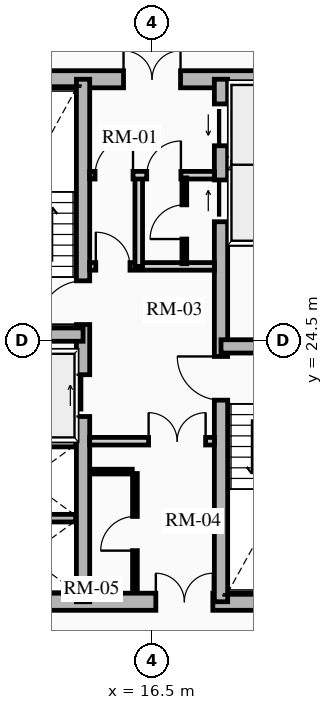
"""IFC4 building model, lengths in metres.
Left out: names, types, materials, properties, quantities, classifications, styles, units other than length and angle.
Written with IfcOpenShell. Run it as: python <this file> out.ifc"""

import sys

from ifc_helpers import new_model, si_unit, direction, frame, frame_2d, origin, place, context, subcontext, project, spatial, rectangle, extrude, source, transform, mapped, element, fill, save


model = new_model("IFC4")
c1 = context("Model", 3, precision=1e-05, world=origin(), true_north=direction((0.0, 1.0)))
c2 = subcontext(c1, "Body", "Model", "MODEL_VIEW")
j1 = project(units=[si_unit("LENGTHUNIT", "METRE"), si_unit("PLANEANGLEUNIT", "RADIAN")], contexts=[c1])
p1 = place(None, origin())
s1 = spatial("IfcSite", under=j1, at=p1, CompositionType="ELEMENT")
p2 = place(p1, origin())
s2 = spatial("IfcBuilding", under=s1, at=p2, CompositionType="ELEMENT")
p3 = place(p2, frame((0.0, 0.0, 70.15)))
s3 = spatial("IfcBuildingStorey", under=s2, at=p3, CompositionType="ELEMENT", Elevation=70.15)
p4 = place(p3, frame((11.15, 17.625, 0.0), z_axis=(0.0, 0.0, 1.0), x_axis=(1.0, 0.0, 0.0)))
e1 = element("IfcWall", 1, at=p4, inside=s3, PredefinedType="SHEAR", context=c2, shape_type="SweptSolid", body=[
    extrude(rectangle(XDim=10.7, YDim=0.45, at=frame_2d((5.35, 0.0))), origin(), (0.0, 0.0, 1.0), 2.91),
])
m1 = source(origin(), c2, "Body", "SweptSolid", [
    extrude(rectangle(XDim=1.5, YDim=2.02, at=frame_2d((0.75, 1.01))), frame((0.0, 0.235, 0.0), z_axis=(0.0, -1.0, 0.0), x_axis=(1.0, 0.0, 0.0)), (0.0, 0.0, 1.0), 0.47),
])
p5 = place(p4, frame((5.45, 0.0, 0.0)))
e2 = element("IfcOpeningElement", 2, at=p5, cuts=e1, PredefinedType="OPENING", context=c2, shape_type="MappedRepresentation", body=[
    mapped(m1, transform((0.0, 0.0, 0.0), x_axis=(1.0, 0.0, 0.0), y_axis=(0.0, 1.0, 0.0), z_axis=(0.0, 0.0, 1.0), scale=1.0)),
])
p6 = place(p3, frame((11.15, 31.375, 0.0), z_axis=(0.0, 0.0, 1.0), x_axis=(1.0, 0.0, 0.0)))
e3 = element("IfcWall", 3, at=p6, inside=s3, PredefinedType="SHEAR", context=c2, shape_type="SweptSolid", body=[
    extrude(rectangle(XDim=10.7, YDim=0.45, at=frame_2d((5.35, 0.0))), origin(), (0.0, 0.0, 1.0), 2.91),
])
p7 = place(p6, frame((4.6, 0.0, 0.0)))
e4 = element("IfcOpeningElement", 4, at=p7, cuts=e3, PredefinedType="OPENING", context=c2, shape_type="MappedRepresentation", body=[
    mapped(m1, transform((0.0, 0.0, 0.0), x_axis=(1.0, 0.0, 0.0), y_axis=(0.0, 1.0, 0.0), z_axis=(0.0, 0.0, 1.0), scale=1.0)),
])
p8 = place(p3, frame((14.685, 17.625, 0.0), z_axis=(0.0, 0.0, 1.0), x_axis=(0.0, 1.0, 0.0)))
e5 = element("IfcWall", 5, at=p8, inside=s3, PredefinedType="SHEAR", context=c2, shape_type="SweptSolid", body=[
    extrude(rectangle(XDim=13.75, YDim=0.35, at=frame_2d((6.875, 0.0))), origin(), (0.0, 0.0, 1.0), 2.91),
])
m2 = source(origin(), c2, "Body", "SweptSolid", [
    extrude(rectangle(XDim=1.1, YDim=2.015, at=frame_2d((0.55, 1.007))), frame((0.0, 0.185, 0.0), z_axis=(0.0, -1.0, 0.0), x_axis=(1.0, 0.0, 0.0)), (0.0, 0.0, 1.0), 0.37),
])
p9 = place(p8, frame((4.875, 0.0, 0.0)))
e6 = element("IfcOpeningElement", 6, at=p9, cuts=e5, PredefinedType="OPENING", context=c2, shape_type="MappedRepresentation", body=[
    mapped(m2, transform((0.0, 0.0, 0.0), x_axis=(1.0, 0.0, 0.0), y_axis=(0.0, 1.0, 0.0), z_axis=(0.0, 0.0, 1.0), scale=1.0)),
])
m3 = source(origin(), c2, "Body", "SweptSolid", [
    extrude(rectangle(XDim=1.15, YDim=2.02, at=frame_2d((0.575, 1.01))), frame((0.0, 0.185, 0.0), z_axis=(0.0, -1.0, 0.0), x_axis=(1.0, 0.0, 0.0)), (0.0, 0.0, 1.0), 0.37),
])
p10 = place(p8, frame((7.295, 0.0, 0.0)))
e7 = element("IfcOpeningElement", 7, at=p10, cuts=e5, PredefinedType="OPENING", context=c2, shape_type="MappedRepresentation", body=[
    mapped(m3, transform((0.0, 0.0, 0.0), x_axis=(1.0, 0.0, 0.0), y_axis=(0.0, 1.0, 0.0), z_axis=(0.0, 0.0, 1.0), scale=1.0)),
])
p11 = place(p3, frame((18.315, 17.625, 0.0), z_axis=(0.0, 0.0, 1.0), x_axis=(0.0, 1.0, 0.0)))
e8 = element("IfcWall", 8, at=p11, inside=s3, PredefinedType="SHEAR", context=c2, shape_type="SweptSolid", body=[
    extrude(rectangle(XDim=13.75, YDim=0.35, at=frame_2d((6.875, 0.0))), origin(), (0.0, 0.0, 1.0), 2.91),
])
p12 = place(p11, frame((10.0, 0.0, 0.0)))
e9 = element("IfcOpeningElement", 9, at=p12, cuts=e8, PredefinedType="OPENING", context=c2, shape_type="MappedRepresentation", body=[
    mapped(m2, transform((0.0, 0.0, 0.0), x_axis=(1.0, 0.0, 0.0), y_axis=(0.0, 1.0, 0.0), z_axis=(0.0, 0.0, 1.0), scale=1.0)),
])
p13 = place(p11, frame((12.0, 0.0, 0.0)))
e10 = element("IfcOpeningElement", 10, at=p13, cuts=e8, PredefinedType="OPENING", context=c2, shape_type="MappedRepresentation", body=[
    mapped(m2, transform((0.0, 0.0, 0.0), x_axis=(1.0, 0.0, 0.0), y_axis=(0.0, 1.0, 0.0), z_axis=(0.0, 0.0, 1.0), scale=1.0)),
])
p14 = place(p11, frame((5.305, 0.0, 0.0)))
e11 = element("IfcOpeningElement", 11, at=p14, cuts=e8, PredefinedType="OPENING", context=c2, shape_type="MappedRepresentation", body=[
    mapped(m3, transform((0.0, 0.0, 0.0), x_axis=(1.0, 0.0, 0.0), y_axis=(0.0, 1.0, 0.0), z_axis=(0.0, 0.0, 1.0), scale=1.0)),
])
for number, where, z_axis, x_axis in (
    (12, (11.4, 24.655, 0.0), (0.0, 0.0, 1.0), (1.0, 0.0, 0.0)),
    (13, (18.315, 24.345, 0.0), (0.0, 0.0, 1.0), (1.0, 0.0, 0.0)),
):
    element("IfcWall", number, at=place(p3, frame(where, z_axis=z_axis, x_axis=x_axis)), inside=s3, PredefinedType="SHEAR", context=c2, shape_type="SweptSolid", body=[
        extrude(rectangle(XDim=3.285, YDim=0.35, at=frame_2d((1.643, 0.0))), origin(), (0.0, 0.0, 1.0), 2.91),
    ])
for number, where, z_axis, x_axis in (
    (14, (11.52, 21.8, 0.0), (0.0, 0.0, 1.0), (1.0, 0.0, 0.0)),
    (15, (11.52, 19.825, 0.0), (0.0, 0.0, 1.0), (1.0, 0.0, 0.0)),
    (16, (18.51, 27.13, 0.0), (0.0, 0.0, 1.0), (1.0, 0.0, 0.0)),
    (17, (18.51, 29.175, 0.0), (0.0, 0.0, 1.0), (1.0, 0.0, 0.0)),
):
    element("IfcWall", number, at=place(p3, frame(where, z_axis=z_axis, x_axis=x_axis)), inside=s3, PredefinedType="SHEAR", context=c2, shape_type="SweptSolid", body=[
        extrude(rectangle(XDim=2.97, YDim=0.2, at=frame_2d((1.485, 0.0))), origin(), (0.0, 0.0, 1.0), 2.91),
    ])
p15 = place(p3, frame((14.86, 21.85, 0.0), z_axis=(0.0, 0.0, 1.0), x_axis=(1.0, 0.0, 0.0)))
e18 = element("IfcWall", 18, at=p15, inside=s3, PredefinedType="PARTITIONING", context=c2, shape_type="SweptSolid", body=[
    extrude(rectangle(XDim=3.28, YDim=0.2, at=frame_2d((1.64, 0.0))), origin(), (0.0, 0.0, 1.0), 2.655),
])
m4 = source(origin(), c2, "Body", "SweptSolid", [
    extrude(rectangle(XDim=1.5, YDim=2.02, at=frame_2d((0.75, 1.01))), frame((0.0, 0.11, 0.0), z_axis=(0.0, -1.0, 0.0), x_axis=(1.0, 0.0, 0.0)), (0.0, 0.0, 1.0), 0.22),
])
p16 = place(p15, frame((1.55, 0.0, 0.0)))
e19 = element("IfcOpeningElement", 19, at=p16, cuts=e18, PredefinedType="OPENING", context=c2, shape_type="MappedRepresentation", body=[
    mapped(m4, transform((0.0, 0.0, 0.0), x_axis=(1.0, 0.0, 0.0), y_axis=(0.0, 1.0, 0.0), z_axis=(0.0, 0.0, 1.0), scale=1.0)),
])
p17 = place(p3, frame((14.86, 26.45, 0.0), z_axis=(0.0, 0.0, 1.0), x_axis=(1.0, 0.0, 0.0)))
e20 = element("IfcWall", 20, at=p17, inside=s3, PredefinedType="PARTITIONING", context=c2, shape_type="SweptSolid", body=[
    extrude(rectangle(XDim=3.28, YDim=0.2, at=frame_2d((1.64, 0.0))), origin(), (0.0, 0.0, 1.0), 2.655),
])
m5 = source(origin(), c2, "Body", "SweptSolid", [
    extrude(rectangle(XDim=0.9, YDim=2.005, at=frame_2d((0.45, 1.002))), frame((0.0, 0.11, 0.0), z_axis=(0.0, -1.0, 0.0), x_axis=(1.0, 0.0, 0.0)), (0.0, 0.0, 1.0), 0.22),
])
p18 = place(p17, frame((0.16, 0.0, 0.0)))
e21 = element("IfcOpeningElement", 21, at=p18, cuts=e20, PredefinedType="OPENING", context=c2, shape_type="MappedRepresentation", body=[
    mapped(m5, transform((0.0, 0.0, 0.0), x_axis=(1.0, 0.0, 0.0), y_axis=(0.0, 1.0, 0.0), z_axis=(0.0, 0.0, 1.0), scale=1.0)),
])
p19 = place(p3, frame((16.15, 26.45, 0.0), z_axis=(0.0, 0.0, 1.0), x_axis=(0.0, 1.0, 0.0)))
e22 = element("IfcWall", 22, at=p19, inside=s3, PredefinedType="PARTITIONING", context=c2, shape_type="SweptSolid", body=[
    extrude(rectangle(XDim=2.4, YDim=0.2, at=frame_2d((1.2, 0.0))), origin(), (0.0, 0.0, 1.0), 2.655),
])
p20 = place(p3, frame((14.86, 28.85, 0.0), z_axis=(0.0, 0.0, 1.0), x_axis=(1.0, 0.0, 0.0)))
e23 = element("IfcWall", 23, at=p20, inside=s3, PredefinedType="PARTITIONING", context=c2, shape_type="SweptSolid", body=[
    extrude(rectangle(XDim=3.28, YDim=0.2, at=frame_2d((1.64, 0.0))), origin(), (0.0, 0.0, 1.0), 2.655),
])
m6 = source(origin(), c2, "Body", "SweptSolid", [
    extrude(rectangle(XDim=1.0, YDim=2.015, at=frame_2d((0.5, 1.007))), frame((0.0, 0.11, 0.0), z_axis=(0.0, -1.0, 0.0), x_axis=(1.0, 0.0, 0.0)), (0.0, 0.0, 1.0), 0.22),
])
p21 = place(p20, frame((0.14, 0.0, 0.0)))
e24 = element("IfcOpeningElement", 24, at=p21, cuts=e23, PredefinedType="OPENING", context=c2, shape_type="MappedRepresentation", body=[
    mapped(m6, transform((0.0, 0.0, 0.0), x_axis=(1.0, 0.0, 0.0), y_axis=(0.0, 1.0, 0.0), z_axis=(0.0, 0.0, 1.0), scale=1.0)),
])
p22 = place(p20, frame((1.5, 0.0, 0.0)))
e25 = element("IfcOpeningElement", 25, at=p22, cuts=e23, PredefinedType="OPENING", context=c2, shape_type="MappedRepresentation", body=[
    mapped(m5, transform((0.0, 0.0, 0.0), x_axis=(1.0, 0.0, 0.0), y_axis=(0.0, 1.0, 0.0), z_axis=(0.0, 0.0, 1.0), scale=1.0)),
])
p23 = place(p3, frame((16.05, 17.92, 0.0), z_axis=(0.0, 0.0, 1.0), x_axis=(0.0, 1.0, 0.0)))
e26 = element("IfcWall", 26, at=p23, inside=s3, PredefinedType="PARTITIONING", context=c2, shape_type="SweptSolid", body=[
    extrude(rectangle(XDim=3.08, YDim=0.125, at=frame_2d((1.54, 0.0))), origin(), (0.0, 0.0, 1.0), 2.655),
])
m7 = source(origin(), c2, "Body", "SweptSolid", [
    extrude(rectangle(XDim=0.9, YDim=2.005, at=frame_2d((0.45, 1.002))), frame((0.0, 0.073, 0.0), z_axis=(0.0, -1.0, 0.0), x_axis=(1.0, 0.0, 0.0)), (0.0, 0.0, 1.0), 0.145),
])
p24 = place(p23, frame((1.05, 0.0, 0.0)))
e27 = element("IfcOpeningElement", 27, at=p24, cuts=e26, PredefinedType="OPENING", context=c2, shape_type="MappedRepresentation", body=[
    mapped(m7, transform((0.0, 0.0, 0.0), x_axis=(1.0, 0.0, 0.0), y_axis=(0.0, 1.0, 0.0), z_axis=(0.0, 0.0, 1.0), scale=1.0)),
])
p25 = place(p3, frame((14.88, 21.05, 0.0), z_axis=(0.0, 0.0, 1.0), x_axis=(1.0, 0.0, 0.0)))
e28 = element("IfcWall", 28, at=p25, inside=s3, PredefinedType="PARTITIONING", context=c2, shape_type="SweptSolid", body=[
    extrude(rectangle(XDim=1.1, YDim=0.125, at=frame_2d((0.55, 0.0))), origin(), (0.0, 0.0, 1.0), 2.655),
])
p26 = place(p3, frame((17.35, 26.52, 0.0), z_axis=(0.0, 0.0, 1.0), x_axis=(0.0, 1.0, 0.0)))
e29 = element("IfcWall", 29, at=p26, inside=s3, PredefinedType="PARTITIONING", context=c2, shape_type="SweptSolid", body=[
    extrude(rectangle(XDim=2.26, YDim=0.125, at=frame_2d((1.13, 0.0))), origin(), (0.0, 0.0, 1.0), 2.655),
])
p27 = place(p26, frame((0.65, 0.0, 0.0)))
e30 = element("IfcOpeningElement", 30, at=p27, cuts=e29, PredefinedType="OPENING", context=c2, shape_type="MappedRepresentation", body=[
    mapped(m7, transform((0.0, 0.0, 0.0), x_axis=(1.0, 0.0, 0.0), y_axis=(0.0, 1.0, 0.0), z_axis=(0.0, 0.0, 1.0), scale=1.0)),
])
m8 = source(origin(), c2, "Body", "SweptSolid", [
    extrude(rectangle(XDim=1.1, YDim=2.015, at=frame_2d((0.55, 1.007))), frame((0.0, 0.025, 0.0), z_axis=(0.0, -1.0, 0.0), x_axis=(1.0, 0.0, 0.0)), (0.0, 0.0, 1.0), 0.05),
])
p28 = place(p9, origin())
e31 = element("IfcDoor", 31, at=p28, inside=s3, OperationType="SLIDING_TO_RIGHT", PredefinedType="DOOR", context=c2, shape_type="MappedRepresentation", body=[
    mapped(m8, transform((0.0, 0.0, 0.0), x_axis=(1.0, 0.0, 0.0), y_axis=(0.0, 1.0, 0.0), z_axis=(0.0, 0.0, 1.0), scale=1.0)),
])
fill(e6, e31)
p29 = place(p12, origin())
e32 = element("IfcDoor", 32, at=p29, inside=s3, OperationType="SLIDING_TO_RIGHT", PredefinedType="DOOR", context=c2, shape_type="MappedRepresentation", body=[
    mapped(m8, transform((0.0, 0.0, 0.0), x_axis=(1.0, 0.0, 0.0), y_axis=(0.0, 1.0, 0.0), z_axis=(0.0, 0.0, 1.0), scale=1.0)),
])
fill(e9, e32)
p30 = place(p13, origin())
e33 = element("IfcDoor", 33, at=p30, inside=s3, OperationType="SLIDING_TO_LEFT", PredefinedType="DOOR", context=c2, shape_type="MappedRepresentation", body=[
    mapped(m8, transform((0.0, 0.0, 0.0), x_axis=(1.0, 0.0, 0.0), y_axis=(0.0, 1.0, 0.0), z_axis=(0.0, 0.0, 1.0), scale=1.0)),
])
fill(e10, e33)
m9 = source(origin(), c2, "Body", "SweptSolid", [
    extrude(rectangle(XDim=1.15, YDim=2.02, at=frame_2d((0.575, 1.01))), frame((0.0, 0.025, 0.0), z_axis=(0.0, -1.0, 0.0), x_axis=(1.0, 0.0, 0.0)), (0.0, 0.0, 1.0), 0.05),
])
p31 = place(p10, origin())
e34 = element("IfcDoor", 34, at=p31, inside=s3, OperationType="SINGLE_SWING_LEFT", PredefinedType="DOOR", context=c2, shape_type="MappedRepresentation", body=[
    mapped(m9, transform((0.0, 0.0, 0.0), x_axis=(1.0, 0.0, 0.0), y_axis=(0.0, 1.0, 0.0), z_axis=(0.0, 0.0, 1.0), scale=1.0)),
])
fill(e7, e34)
p32 = place(p14, origin())
e35 = element("IfcDoor", 35, at=p32, inside=s3, OperationType="SINGLE_SWING_RIGHT", PredefinedType="DOOR", context=c2, shape_type="MappedRepresentation", body=[
    mapped(m9, transform((0.0, 0.0, 0.0), x_axis=(1.0, 0.0, 0.0), y_axis=(0.0, 1.0, 0.0), z_axis=(0.0, 0.0, 1.0), scale=1.0)),
])
fill(e11, e35)
m10 = source(origin(), c2, "Body", "SweptSolid", [
    extrude(rectangle(XDim=1.5, YDim=2.02, at=frame_2d((0.75, 1.01))), frame((0.0, 0.025, 0.0), z_axis=(0.0, -1.0, 0.0), x_axis=(1.0, 0.0, 0.0)), (0.0, 0.0, 1.0), 0.05),
])
p33 = place(p7, origin())
e36 = element("IfcDoor", 36, at=p33, inside=s3, OperationType="DOUBLE_DOOR_SINGLE_SWING", PredefinedType="DOOR", context=c2, shape_type="MappedRepresentation", body=[
    mapped(m10, transform((0.0, 0.0, 0.0), x_axis=(1.0, 0.0, 0.0), y_axis=(0.0, 1.0, 0.0), z_axis=(0.0, 0.0, 1.0), scale=1.0)),
])
fill(e4, e36)
p34 = place(p5, origin())
e37 = element("IfcDoor", 37, at=p34, inside=s3, OperationType="DOUBLE_DOOR_SINGLE_SWING", PredefinedType="DOOR", context=c2, shape_type="MappedRepresentation", body=[
    mapped(m10, transform((0.0, 0.0, 0.0), x_axis=(1.0, 0.0, 0.0), y_axis=(0.0, 1.0, 0.0), z_axis=(0.0, 0.0, 1.0), scale=1.0)),
])
fill(e2, e37)
p35 = place(p16, origin())
e38 = element("IfcDoor", 38, at=p35, inside=s3, OperationType="DOUBLE_DOOR_SINGLE_SWING", PredefinedType="DOOR", context=c2, shape_type="MappedRepresentation", body=[
    mapped(m10, transform((0.0, 0.0, 0.0), x_axis=(1.0, 0.0, 0.0), y_axis=(0.0, 1.0, 0.0), z_axis=(0.0, 0.0, 1.0), scale=1.0)),
])
fill(e19, e38)
m11 = source(origin(), c2, "Body", "SweptSolid", [
    extrude(rectangle(XDim=0.9, YDim=2.005, at=frame_2d((0.45, 1.002))), frame((0.0, 0.025, 0.0), z_axis=(0.0, -1.0, 0.0), x_axis=(1.0, 0.0, 0.0)), (0.0, 0.0, 1.0), 0.05),
])
p36 = place(p18, origin())
e39 = element("IfcDoor", 39, at=p36, inside=s3, OperationType="SINGLE_SWING_LEFT", PredefinedType="DOOR", context=c2, shape_type="MappedRepresentation", body=[
    mapped(m11, transform((0.0, 0.0, 0.0), x_axis=(1.0, 0.0, 0.0), y_axis=(0.0, 1.0, 0.0), z_axis=(0.0, 0.0, 1.0), scale=1.0)),
])
fill(e21, e39)
m12 = source(origin(), c2, "Body", "SweptSolid", [
    extrude(rectangle(XDim=1.0, YDim=2.015, at=frame_2d((0.5, 1.007))), frame((0.0, 0.025, 0.0), z_axis=(0.0, -1.0, 0.0), x_axis=(1.0, 0.0, 0.0)), (0.0, 0.0, 1.0), 0.05),
])
p37 = place(p21, origin())
e40 = element("IfcDoor", 40, at=p37, inside=s3, OperationType="SINGLE_SWING_RIGHT", PredefinedType="DOOR", context=c2, shape_type="MappedRepresentation", body=[
    mapped(m12, transform((0.0, 0.0, 0.0), x_axis=(1.0, 0.0, 0.0), y_axis=(0.0, 1.0, 0.0), z_axis=(0.0, 0.0, 1.0), scale=1.0)),
])
fill(e24, e40)
p38 = place(p24, origin())
e41 = element("IfcDoor", 41, at=p38, inside=s3, OperationType="SINGLE_SWING_LEFT", PredefinedType="DOOR", context=c2, shape_type="MappedRepresentation", body=[
    mapped(m11, transform((0.0, 0.0, 0.0), x_axis=(1.0, 0.0, 0.0), y_axis=(0.0, 1.0, 0.0), z_axis=(0.0, 0.0, 1.0), scale=1.0)),
])
fill(e27, e41)
p39 = place(p22, origin())
e42 = element("IfcDoor", 42, at=p39, inside=s3, OperationType="SINGLE_SWING_RIGHT", PredefinedType="DOOR", context=c2, shape_type="MappedRepresentation", body=[
    mapped(m11, transform((0.0, 0.0, 0.0), x_axis=(1.0, 0.0, 0.0), y_axis=(0.0, 1.0, 0.0), z_axis=(0.0, 0.0, 1.0), scale=1.0)),
])
fill(e25, e42)
p40 = place(p27, origin())
e43 = element("IfcDoor", 43, at=p40, inside=s3, OperationType="SINGLE_SWING_LEFT", PredefinedType="DOOR", context=c2, shape_type="MappedRepresentation", body=[
    mapped(m11, transform((0.0, 0.0, 0.0), x_axis=(1.0, 0.0, 0.0), y_axis=(0.0, 1.0, 0.0), z_axis=(0.0, 0.0, 1.0), scale=1.0)),
])
fill(e30, e43)
save(model, sys.argv[1])
